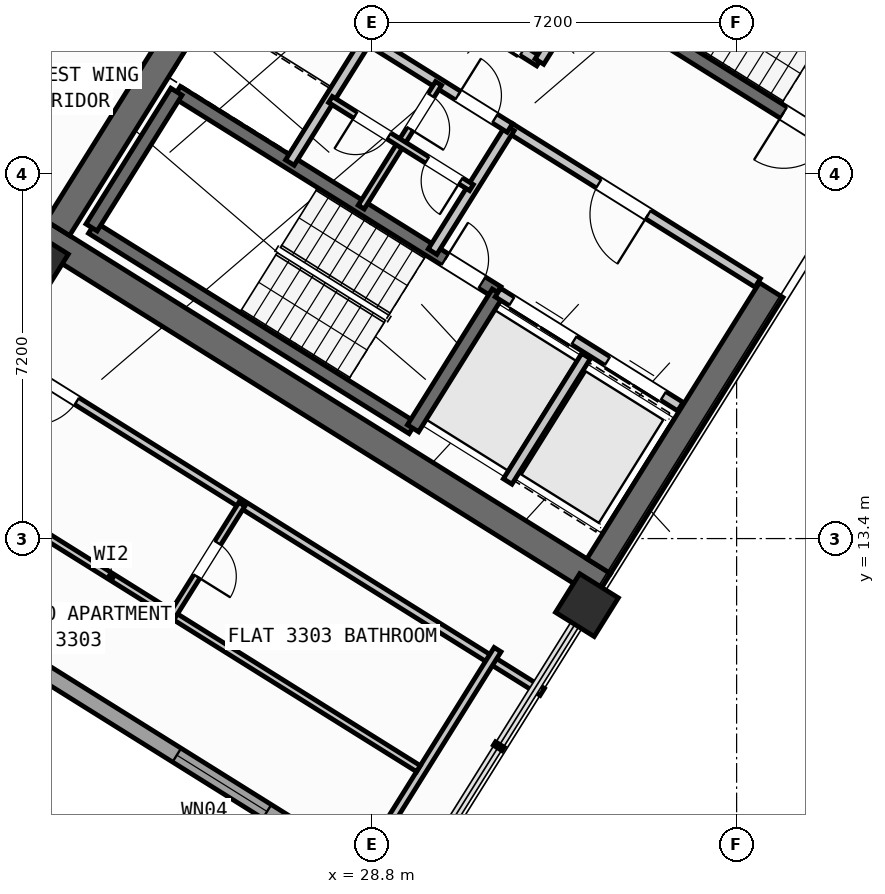
"""IFC4 building model, lengths in metres.
Left out: names, types, materials, properties, quantities, classifications, styles, units other than length and angle.
Written with IfcOpenShell. Run it as: python <this file> out.ifc"""

import sys

from ifc_helpers import new_model, si_unit, direction, frame, frame_2d, origin, origin_2d, place, context, subcontext, project, spatial, rectangle, hollow_rectangle, extrude, source, transform, mapped, element, fill, save


model = new_model("IFC4")
c1 = context("Model", 3, precision=1e-05, world=origin(), true_north=direction((0.0, 1.0)))
c2 = subcontext(c1, "Body", "Model", "MODEL_VIEW")
j1 = project(units=[si_unit("LENGTHUNIT", "METRE"), si_unit("PLANEANGLEUNIT", "RADIAN")], contexts=[c1])
p1 = place(None, origin())
s1 = spatial("IfcSite", under=j1, at=p1, CompositionType="ELEMENT")
p2 = place(p1, origin())
s2 = spatial("IfcBuilding", under=s1, at=p2, CompositionType="ELEMENT")
p3 = place(p2, frame((0.0, 0.0, 132.6)))
s3 = spatial("IfcBuildingStorey", under=s2, at=p3, CompositionType="ELEMENT", Elevation=132.6)
p4 = place(p3, frame((33.366, 12.477, 0.0), z_axis=(0.0, 0.0, 1.0), x_axis=(-0.848047359947, 0.529920442413, 0.0)))
e1 = element("IfcWall", 1, at=p4, inside=s3, PredefinedType="SHEAR", context=c2, shape_type="SweptSolid", body=[
    extrude(rectangle(XDim=13.14, YDim=0.55, at=frame_2d((6.57, 0.0))), origin(), (0.0, 0.0, 1.0), 3.32),
])
p5 = place(p3, frame((36.683, 18.304, 0.0), z_axis=(0.0, 0.0, 1.0), x_axis=(-0.529896466841, -0.848062341122, 0.0)))
e2 = element("IfcWall", 2, at=p5, inside=s3, PredefinedType="SHEAR", context=c2, shape_type="SweptSolid", body=[
    extrude(rectangle(XDim=6.425, YDim=0.55, at=frame_2d((3.212, 0.0))), origin(), (0.0, 0.0, 1.0), 3.32),
])
p6 = place(p3, frame((26.007, 24.976, 0.0), z_axis=(0.0, 0.0, 1.0), x_axis=(-0.529923795287, -0.848045264823, 0.0)))
e3 = element("IfcWall", 3, at=p6, inside=s3, PredefinedType="SHEAR", context=c2, shape_type="SweptSolid", body=[
    extrude(rectangle(XDim=6.425, YDim=0.55, at=frame_2d((3.212, 0.0))), origin(), (0.0, 0.0, 1.0), 3.32),
])
m1 = source(origin(), c2, "Body", "SweptSolid", [
    extrude(hollow_rectangle(XDim=0.9, YDim=0.9, WallThickness=0.036, at=origin_2d()), origin(), (0.0, 0.0, 1.0), 3.6),
])
for number, where, z_axis, x_axis in (
    (4, (33.046, 12.087, 0.0), (0.0, 0.0, 1.0), (-0.848, 0.53, 0.0)),
    (5, (22.191, 18.87, 0.0), (0.0, 0.0, 1.0), (-0.848, 0.53, 0.0)),
):
    element("IfcColumn", number, at=place(p3, frame(where, z_axis=z_axis, x_axis=x_axis)), inside=s3, PredefinedType="COLUMN", context=c2, shape_type="MappedRepresentation", body=[
        mapped(m1, transform((0.0, 0.0, 0.0), scale=1.0)),
    ])
p7 = place(p3, frame((29.268, 6.429, 0.0), z_axis=(0.0, 0.0, 1.0), x_axis=(-0.848049971435, 0.529916263149, 0.0)))
e6 = element("IfcWall", 6, at=p7, inside=s3, PredefinedType="STANDARD", context=c2, shape_type="SweptSolid", body=[
    extrude(rectangle(XDim=31.588, YDim=0.32, at=frame_2d((15.794, 0.0))), origin(), (0.0, 0.0, 1.0), 3.32),
])
p8 = place(p7, frame((16.362, 0.0, 0.0)))
e7 = element("IfcOpeningElement", 7, at=p8, cuts=e6, PredefinedType="OPENING", context=c2, shape_type="SweptSolid", body=[
    extrude(rectangle(XDim=1.2, YDim=2.15, at=frame_2d((0.6, 1.075))), frame((0.0, 0.17, 0.0), z_axis=(0.0, -1.0, 0.0), x_axis=(1.0, 0.0, 0.0)), (0.0, 0.0, 1.0), 0.34),
])
p9 = place(p7, frame((2.989, 0.0, 0.8)))
e8 = element("IfcOpeningElement", 8, at=p9, cuts=e6, PredefinedType="OPENING", context=c2, shape_type="SweptSolid", body=[
    extrude(rectangle(XDim=2.1, YDim=1.55, at=frame_2d((1.05, 0.775))), frame((0.0, 0.17, 0.0), z_axis=(0.0, -1.0, 0.0), x_axis=(1.0, 0.0, 0.0)), (0.0, 0.0, 1.0), 0.34),
])
p10 = place(p7, frame((8.359, 0.0, 0.8)))
e9 = element("IfcOpeningElement", 9, at=p10, cuts=e6, PredefinedType="OPENING", context=c2, shape_type="SweptSolid", body=[
    extrude(rectangle(XDim=2.1, YDim=1.55, at=frame_2d((1.05, 0.775))), frame((0.0, 0.17, 0.0), z_axis=(0.0, -1.0, 0.0), x_axis=(1.0, 0.0, 0.0)), (0.0, 0.0, 1.0), 0.34),
])
p11 = place(p7, frame((13.284, 0.0, 0.95)))
e10 = element("IfcOpeningElement", 10, at=p11, cuts=e6, PredefinedType="OPENING", context=c2, shape_type="SweptSolid", body=[
    extrude(rectangle(XDim=1.2, YDim=1.4, at=frame_2d((0.6, 0.7))), frame((0.0, 0.17, 0.0), z_axis=(0.0, -1.0, 0.0), x_axis=(1.0, 0.0, 0.0)), (0.0, 0.0, 1.0), 0.34),
])
p12 = place(p7, frame((20.39, 0.0, 0.95)))
e11 = element("IfcOpeningElement", 11, at=p12, cuts=e6, PredefinedType="OPENING", context=c2, shape_type="SweptSolid", body=[
    extrude(rectangle(XDim=1.2, YDim=1.4, at=frame_2d((0.6, 0.7))), frame((0.0, 0.17, 0.0), z_axis=(0.0, -1.0, 0.0), x_axis=(1.0, 0.0, 0.0)), (0.0, 0.0, 1.0), 0.34),
])
p13 = place(p7, frame((23.715, 0.0, 1.0)))
e12 = element("IfcOpeningElement", 12, at=p13, cuts=e6, PredefinedType="OPENING", context=c2, shape_type="SweptSolid", body=[
    extrude(rectangle(XDim=0.9, YDim=1.25, at=frame_2d((0.45, 0.625))), frame((0.0, 0.17, 0.0), z_axis=(0.0, -1.0, 0.0), x_axis=(1.0, 0.0, 0.0)), (0.0, 0.0, 1.0), 0.34),
])
p14 = place(p7, frame((27.481, 0.0, 0.8)))
e13 = element("IfcOpeningElement", 13, at=p14, cuts=e6, PredefinedType="OPENING", context=c2, shape_type="SweptSolid", body=[
    extrude(rectangle(XDim=2.1, YDim=1.55, at=frame_2d((1.05, 0.775))), frame((0.0, 0.17, 0.0), z_axis=(0.0, -1.0, 0.0), x_axis=(1.0, 0.0, 0.0)), (0.0, 0.0, 1.0), 0.34),
])
p15 = place(p3, frame((29.605, 15.581, 0.0), z_axis=(0.0, 0.0, 1.0), x_axis=(-0.848036911448, 0.529937163087, 0.0)))
e14 = element("IfcWall", 14, at=p15, inside=s3, PredefinedType="SHEAR", context=c2, shape_type="SweptSolid", body=[
    extrude(rectangle(XDim=7.46, YDim=0.26, at=frame_2d((3.73, 0.0))), origin(), (0.0, 0.0, 1.0), 3.32),
])
p16 = place(p3, frame((31.28, 18.261, 0.0), z_axis=(0.0, 0.0, 1.0), x_axis=(-0.848051618787, 0.529913626805, 0.0)))
e15 = element("IfcWall", 15, at=p16, inside=s3, PredefinedType="SHEAR", context=c2, shape_type="SweptSolid", body=[
    extrude(rectangle(XDim=7.46, YDim=0.26, at=frame_2d((3.73, 0.0))), origin(), (0.0, 0.0, 1.0), 3.32),
])
p17 = place(p16, frame((0.36, 0.0, 0.0)))
e16 = element("IfcOpeningElement", 16, at=p17, cuts=e15, PredefinedType="OPENING", context=c2, shape_type="SweptSolid", body=[
    extrude(rectangle(XDim=0.86, YDim=2.05, at=frame_2d((0.43, 1.025))), frame((0.0, 0.14, 0.0), z_axis=(0.0, -1.0, 0.0), x_axis=(1.0, 0.0, 0.0)), (0.0, 0.0, 1.0), 0.28),
])
p18 = place(p3, frame((31.288, 18.256, 0.0), z_axis=(0.0, 0.0, 1.0), x_axis=(-0.529943379326, -0.848033026897, 0.0)))
e17 = element("IfcWall", 17, at=p18, inside=s3, PredefinedType="SHEAR", context=c2, shape_type="SweptSolid", body=[
    extrude(rectangle(XDim=3.16, YDim=0.26, at=frame_2d((1.58, 0.0))), origin(), (0.0, 0.0, 1.0), 3.32),
])
p19 = place(p3, frame((24.945, 22.22, 0.0), z_axis=(0.0, 0.0, 1.0), x_axis=(-0.529908658664, -0.84805472316, 0.0)))
e18 = element("IfcWall", 18, at=p19, inside=s3, PredefinedType="SHEAR", context=c2, shape_type="SweptSolid", body=[
    extrude(rectangle(XDim=3.16, YDim=0.26, at=frame_2d((1.58, 0.0))), origin(), (0.0, 0.0, 1.0), 3.32),
])
p20 = place(p3, frame((38.046, 21.108, 0.0), z_axis=(0.0, 0.0, 1.0), x_axis=(-0.848054434086, 0.529909121291, 0.0)))
e19 = element("IfcWall", 19, at=p20, inside=s3, PredefinedType="SHEAR", context=c2, shape_type="SweptSolid", body=[
    extrude(rectangle(XDim=7.33, YDim=0.26, at=frame_2d((3.665, 0.0))), origin(), (0.0, 0.0, 1.0), 3.32),
])
p21 = place(p20, frame((0.22, 0.0, 0.0)))
e20 = element("IfcOpeningElement", 20, at=p21, cuts=e19, PredefinedType="OPENING", context=c2, shape_type="SweptSolid", body=[
    extrude(rectangle(XDim=1.1, YDim=2.1, at=frame_2d((0.55, 1.05))), frame((0.0, 0.14, 0.0), z_axis=(0.0, -1.0, 0.0), x_axis=(1.0, 0.0, 0.0)), (0.0, 0.0, 1.0), 0.28),
])
p22 = place(p3, frame((34.891, 16.005, 0.0), z_axis=(0.0, 0.0, 1.0), x_axis=(-0.848062873452, 0.529895614884, 0.0)))
e21 = element("IfcWall", 21, at=p22, inside=s3, PredefinedType="STANDARD", context=c2, shape_type="SweptSolid", body=[
    extrude(rectangle(XDim=4.248, YDim=0.2, at=frame_2d((2.124, 0.0))), origin(), (0.0, 0.0, 1.0), 3.31),
])
p23 = place(p22, frame((0.398, 0.0, 0.0)))
e22 = element("IfcOpeningElement", 22, at=p23, cuts=e21, PredefinedType="OPENING", context=c2, shape_type="SweptSolid", body=[
    extrude(rectangle(XDim=1.3, YDim=2.2, at=frame_2d((0.65, 1.1))), frame((0.0, 0.11, 0.0), z_axis=(0.0, -1.0, 0.0), x_axis=(1.0, 0.0, 0.0)), (0.0, 0.0, 1.0), 0.22),
])
p24 = place(p22, frame((2.473, 0.0, 0.0)))
e23 = element("IfcOpeningElement", 23, at=p24, cuts=e21, PredefinedType="OPENING", context=c2, shape_type="SweptSolid", body=[
    extrude(rectangle(XDim=1.45, YDim=2.25, at=frame_2d((0.725, 1.125))), frame((0.0, 0.11, 0.0), z_axis=(0.0, -1.0, 0.0), x_axis=(1.0, 0.0, 0.0)), (0.0, 0.0, 1.0), 0.22),
])
p25 = place(p3, frame((36.417, 18.447, 0.0), z_axis=(0.0, 0.0, 1.0), x_axis=(-0.848064879198, 0.529892404805, 0.0)))
e24 = element("IfcWall", 24, at=p25, inside=s3, PredefinedType="STANDARD", context=c2, shape_type="SweptSolid", body=[
    extrude(rectangle(XDim=5.768, YDim=0.2, at=frame_2d((2.884, 0.0))), origin(), (0.0, 0.0, 1.0), 3.31),
])
p26 = place(p25, frame((2.548, 0.0, 0.0)))
e25 = element("IfcOpeningElement", 25, at=p26, cuts=e24, PredefinedType="OPENING", context=c2, shape_type="SweptSolid", body=[
    extrude(rectangle(XDim=1.15, YDim=2.1, at=frame_2d((0.575, 1.05))), frame((0.0, 0.11, 0.0), z_axis=(0.0, -1.0, 0.0), x_axis=(1.0, 0.0, 0.0)), (0.0, 0.0, 1.0), 0.22),
])
p27 = place(p3, frame((32.108, 22.814, 0.0), z_axis=(0.0, 0.0, 1.0), x_axis=(-0.848042229521, 0.529928652696, 0.0)))
e26 = element("IfcWall", 26, at=p27, inside=s3, PredefinedType="STANDARD", context=c2, shape_type="SweptSolid", body=[
    extrude(rectangle(XDim=5.62, YDim=0.2, at=frame_2d((2.81, 0.0))), origin(), (0.0, 0.0, 1.0), 3.31),
])
p28 = place(p27, frame((0.39, 0.0, 0.0)))
e27 = element("IfcOpeningElement", 27, at=p28, cuts=e26, PredefinedType="OPENING", context=c2, shape_type="SweptSolid", body=[
    extrude(rectangle(XDim=1.1, YDim=2.15, at=frame_2d((0.55, 1.075))), frame((0.0, 0.11, 0.0), z_axis=(0.0, -1.0, 0.0), x_axis=(1.0, 0.0, 0.0)), (0.0, 0.0, 1.0), 0.22),
])
p29 = place(p27, frame((2.25, 0.0, 0.0)))
e28 = element("IfcOpeningElement", 28, at=p29, cuts=e26, PredefinedType="OPENING", context=c2, shape_type="SweptSolid", body=[
    extrude(rectangle(XDim=1.1, YDim=2.15, at=frame_2d((0.55, 1.075))), frame((0.0, 0.11, 0.0), z_axis=(0.0, -1.0, 0.0), x_axis=(1.0, 0.0, 0.0)), (0.0, 0.0, 1.0), 0.22),
])
p30 = place(p27, frame((4.11, 0.0, 0.0)))
e29 = element("IfcOpeningElement", 29, at=p30, cuts=e26, PredefinedType="OPENING", context=c2, shape_type="SweptSolid", body=[
    extrude(rectangle(XDim=1.1, YDim=2.15, at=frame_2d((0.55, 1.075))), frame((0.0, 0.11, 0.0), z_axis=(0.0, -1.0, 0.0), x_axis=(1.0, 0.0, 0.0)), (0.0, 0.0, 1.0), 0.22),
])
p31 = place(p3, frame((32.982, 24.213, 0.0), z_axis=(0.0, 0.0, 1.0), x_axis=(-0.529839334948, -0.84809803628, 0.0)))
e30 = element("IfcWall", 30, at=p31, inside=s3, PredefinedType="STANDARD", context=c2, shape_type="SweptSolid", body=[
    extrude(rectangle(XDim=1.65, YDim=0.2, at=frame_2d((0.825, 0.0))), origin(), (0.0, 0.0, 1.0), 3.31),
])
p32 = place(p3, frame((33.029, 17.003, 0.0), z_axis=(0.0, 0.0, 1.0), x_axis=(-0.529916267533, -0.848049968695, 0.0)))
e31 = element("IfcWall", 31, at=p32, inside=s3, PredefinedType="STANDARD", context=c2, shape_type="SweptSolid", body=[
    extrude(rectangle(XDim=2.92, YDim=0.2, at=frame_2d((1.46, 0.0))), origin(), (0.0, 0.0, 1.0), 3.31),
])
for number, where, z_axis, x_axis in (
    (32, (31.525, 21.504, 0.0), (0.0, 0.0, 1.0), (-0.53, -0.848, 0.0)),
    (33, (28.71, 23.263, 0.0), (0.0, 0.0, 1.0), (-0.53, -0.848, 0.0)),
):
    element("IfcWall", number, at=place(p3, frame(where, z_axis=z_axis, x_axis=x_axis)), inside=s3, PredefinedType="STANDARD", context=c2, shape_type="SweptSolid", body=[
        extrude(rectangle(XDim=2.88, YDim=0.2, at=frame_2d((1.44, 0.0))), origin(), (0.0, 0.0, 1.0), 3.31),
    ])
p33 = place(p3, frame((31.525, 21.504, 0.0), z_axis=(0.0, 0.0, 1.0), x_axis=(-0.848040211232, 0.529931882541, 0.0)))
e34 = element("IfcWall", 34, at=p33, inside=s3, PredefinedType="STANDARD", context=c2, shape_type="SweptSolid", body=[
    extrude(rectangle(XDim=6.218, YDim=0.2, at=frame_2d((3.109, 0.0))), origin(), (0.0, 0.0, 1.0), 3.31),
])
p34 = place(p33, frame((4.4, 0.0, 0.0)))
e35 = element("IfcOpeningElement", 35, at=p34, cuts=e34, PredefinedType="OPENING", context=c2, shape_type="SweptSolid", body=[
    extrude(rectangle(XDim=0.86, YDim=2.05, at=frame_2d((0.43, 1.025))), frame((0.0, 0.11, 0.0), z_axis=(0.0, -1.0, 0.0), x_axis=(1.0, 0.0, 0.0)), (0.0, 0.0, 1.0), 0.22),
])
p35 = place(p33, frame((0.35, 0.0, 0.0)))
e36 = element("IfcOpeningElement", 36, at=p35, cuts=e34, PredefinedType="OPENING", context=c2, shape_type="SweptSolid", body=[
    extrude(rectangle(XDim=0.86, YDim=2.05, at=frame_2d((0.43, 1.025))), frame((0.0, 0.11, 0.0), z_axis=(0.0, -1.0, 0.0), x_axis=(1.0, 0.0, 0.0)), (0.0, 0.0, 1.0), 0.22),
])
p36 = place(p3, frame((30.117, 22.384, 0.0), z_axis=(0.0, 0.0, 1.0), x_axis=(-0.529951914384, -0.848027693204, 0.0)))
e37 = element("IfcWall", 37, at=p36, inside=s3, PredefinedType="PLUMBINGWALL", context=c2, shape_type="SweptSolid", body=[
    extrude(rectangle(XDim=1.4, YDim=0.14, at=frame_2d((0.7, 0.0))), origin(), (0.0, 0.0, 1.0), 3.31),
])
p37 = place(p36, frame((0.28, 0.0, 0.0)))
e38 = element("IfcOpeningElement", 38, at=p37, cuts=e37, PredefinedType="OPENING", context=c2, shape_type="SweptSolid", body=[
    extrude(rectangle(XDim=0.78, YDim=2.05, at=frame_2d((0.39, 1.025))), frame((0.0, 0.08, 0.0), z_axis=(0.0, -1.0, 0.0), x_axis=(1.0, 0.0, 0.0)), (0.0, 0.0, 1.0), 0.16),
])
p38 = place(p3, frame((29.375, 21.196, 0.0), z_axis=(0.0, 0.0, 1.0), x_axis=(-0.529865479138, -0.848081702443, 0.0)))
e39 = element("IfcWall", 39, at=p38, inside=s3, PredefinedType="PLUMBINGWALL", context=c2, shape_type="SweptSolid", body=[
    extrude(rectangle(XDim=1.48, YDim=0.14, at=frame_2d((0.74, 0.0))), origin(), (0.0, 0.0, 1.0), 3.31),
])
p39 = place(p3, frame((30.766, 20.327, 0.0), z_axis=(0.0, 0.0, 1.0), x_axis=(-0.848052663127, 0.529911955482, 0.0)))
e40 = element("IfcWall", 40, at=p39, inside=s3, PredefinedType="PLUMBINGWALL", context=c2, shape_type="SweptSolid", body=[
    extrude(rectangle(XDim=3.28, YDim=0.14, at=frame_2d((1.64, 0.0))), origin(), (0.0, 0.0, 1.0), 3.31),
])
p40 = place(p39, frame((0.25, 0.0, 0.0)))
e41 = element("IfcOpeningElement", 41, at=p40, cuts=e40, PredefinedType="OPENING", context=c2, shape_type="SweptSolid", body=[
    extrude(rectangle(XDim=0.78, YDim=2.05, at=frame_2d((0.39, 1.025))), frame((0.0, 0.08, 0.0), z_axis=(0.0, -1.0, 0.0), x_axis=(1.0, 0.0, 0.0)), (0.0, 0.0, 1.0), 0.16),
])
p41 = place(p39, frame((1.92, 0.0, 0.0)))
e42 = element("IfcOpeningElement", 42, at=p41, cuts=e40, PredefinedType="OPENING", context=c2, shape_type="SweptSolid", body=[
    extrude(rectangle(XDim=0.78, YDim=2.05, at=frame_2d((0.39, 1.025))), frame((0.0, 0.08, 0.0), z_axis=(0.0, -1.0, 0.0), x_axis=(1.0, 0.0, 0.0)), (0.0, 0.0, 1.0), 0.16),
])
p42 = place(p3, frame((24.588, 27.631, 0.0), z_axis=(0.0, 0.0, 1.0), x_axis=(-0.529914586043, -0.848051019396, 0.0)))
e43 = element("IfcWall", 43, at=p42, inside=s3, PredefinedType="PARTITIONING", context=c2, shape_type="SweptSolid", body=[
    extrude(rectangle(XDim=15.35, YDim=0.16, at=frame_2d((7.675, 0.0))), origin(), (0.0, 0.0, 1.0), 3.31),
])
p43 = place(p3, frame((32.164, 10.374, 0.0), z_axis=(0.0, 0.0, 1.0), x_axis=(-0.848044107957, 0.529925646633, 0.0)))
e44 = element("IfcWall", 44, at=p43, inside=s3, PredefinedType="PARTITIONING", context=c2, shape_type="SweptSolid", body=[
    extrude(rectangle(XDim=15.57, YDim=0.16, at=frame_2d((7.785, 0.0))), origin(), (0.0, 0.0, 1.0), 3.31),
])
p44 = place(p43, frame((10.83, 0.0, 0.0)))
e45 = element("IfcOpeningElement", 45, at=p44, cuts=e44, PredefinedType="OPENING", context=c2, shape_type="SweptSolid", body=[
    extrude(rectangle(XDim=1.0, YDim=2.1, at=frame_2d((0.5, 1.05))), frame((0.0, 0.09, 0.0), z_axis=(0.0, -1.0, 0.0), x_axis=(1.0, 0.0, 0.0)), (0.0, 0.0, 1.0), 0.18),
])
p45 = place(p3, frame((31.282, 11.208, 0.0), z_axis=(0.0, 0.0, 1.0), x_axis=(-0.529938869374, -0.84803584519, 0.0)))
e46 = element("IfcWall", 46, at=p45, inside=s3, PredefinedType="PARTITIONING", context=c2, shape_type="SweptSolid", body=[
    extrude(rectangle(XDim=5.48, YDim=0.16, at=frame_2d((2.74, 0.0))), origin(), (0.0, 0.0, 1.0), 3.31),
])
p46 = place(p3, frame((29.72, 8.859, 0.0), z_axis=(0.0, 0.0, 1.0), x_axis=(-0.848049134363, 0.529917602752, 0.0)))
e47 = element("IfcWall", 47, at=p46, inside=s3, PredefinedType="PLUMBINGWALL", context=c2, shape_type="SweptSolid", body=[
    extrude(rectangle(XDim=14.3, YDim=0.14, at=frame_2d((7.15, 0.0))), origin(), (0.0, 0.0, 1.0), 3.31),
])
p47 = place(p46, frame((9.57, 0.0, 0.0)))
e48 = element("IfcOpeningElement", 48, at=p47, cuts=e47, PredefinedType="OPENING", context=c2, shape_type="SweptSolid", body=[
    extrude(rectangle(XDim=0.92, YDim=2.08, at=frame_2d((0.46, 1.04))), frame((0.0, 0.08, 0.0), z_axis=(0.0, -1.0, 0.0), x_axis=(1.0, 0.0, 0.0)), (0.0, 0.0, 1.0), 0.16),
])
p48 = place(p3, frame((26.237, 14.078, 0.0), z_axis=(0.0, 0.0, 1.0), x_axis=(-0.52995640672, -0.848024885824, 0.0)))
e49 = element("IfcWall", 49, at=p48, inside=s3, PredefinedType="PLUMBINGWALL", context=c2, shape_type="SweptSolid", body=[
    extrude(rectangle(XDim=2.58, YDim=0.14, at=frame_2d((1.29, 0.0))), origin(), (0.0, 0.0, 1.0), 3.31),
])
p49 = place(p48, frame((0.9, 0.0, 0.0)))
e50 = element("IfcOpeningElement", 50, at=p49, cuts=e49, PredefinedType="OPENING", context=c2, shape_type="SweptSolid", body=[
    extrude(rectangle(XDim=0.78, YDim=2.05, at=frame_2d((0.39, 1.025))), frame((0.0, 0.08, 0.0), z_axis=(0.0, -1.0, 0.0), x_axis=(1.0, 0.0, 0.0)), (0.0, 0.0, 1.0), 0.16),
])
m2 = source(origin(), c2, "Body", "SweptSolid", [
    extrude(rectangle(XDim=2.1, YDim=1.55, at=frame_2d((1.05, 0.775))), frame((0.0, 0.03, 0.0), z_axis=(0.0, -1.0, 0.0), x_axis=(1.0, 0.0, 0.0)), (0.0, 0.0, 1.0), 0.06),
])
p50 = place(p9, origin())
e51 = element("IfcWindow", 51, at=p50, inside=s3, PartitioningType="SINGLE_PANEL", PredefinedType="WINDOW", context=c2, shape_type="MappedRepresentation", body=[
    mapped(m2, transform((0.0, 0.0, 0.0), scale=1.0)),
])
fill(e8, e51)
m3 = source(origin(), c2, "Body", "SweptSolid", [
    extrude(rectangle(XDim=0.86, YDim=2.05, at=frame_2d((0.43, 1.025))), frame((0.0, 0.025, 0.0), z_axis=(0.0, -1.0, 0.0), x_axis=(1.0, 0.0, 0.0)), (0.0, 0.0, 1.0), 0.05),
])
p51 = place(p17, frame((0.86, 0.0, 0.0), z_axis=(0.0, 0.0, 1.0), x_axis=(-1.0, 0.0, 0.0)))
e52 = element("IfcDoor", 52, at=p51, inside=s3, OperationType="SINGLE_SWING_LEFT", PredefinedType="DOOR", context=c2, shape_type="MappedRepresentation", body=[
    mapped(m3, transform((0.0, 0.0, 0.0), scale=1.0)),
])
fill(e16, e52)
m4 = source(origin(), c2, "Body", "SweptSolid", [
    extrude(rectangle(XDim=1.1, YDim=2.1, at=frame_2d((0.55, 1.05))), frame((0.0, 0.025, 0.0), z_axis=(0.0, -1.0, 0.0), x_axis=(1.0, 0.0, 0.0)), (0.0, 0.0, 1.0), 0.05),
])
p52 = place(p21, origin())
e53 = element("IfcDoor", 53, at=p52, inside=s3, OperationType="SINGLE_SWING_RIGHT", PredefinedType="DOOR", context=c2, shape_type="MappedRepresentation", body=[
    mapped(m4, transform((0.0, 0.0, 0.0), scale=1.0)),
])
fill(e20, e53)
m5 = source(origin(), c2, "Body", "SweptSolid", [
    extrude(rectangle(XDim=1.15, YDim=2.1, at=frame_2d((0.575, 1.05))), frame((0.0, 0.025, 0.0), z_axis=(0.0, -1.0, 0.0), x_axis=(1.0, 0.0, 0.0)), (0.0, 0.0, 1.0), 0.05),
])
p53 = place(p26, origin())
e54 = element("IfcDoor", 54, at=p53, inside=s3, OperationType="SINGLE_SWING_LEFT", PredefinedType="DOOR", context=c2, shape_type="MappedRepresentation", body=[
    mapped(m5, transform((0.0, 0.0, 0.0), scale=1.0)),
])
fill(e25, e54)
m6 = source(origin(), c2, "Body", "SweptSolid", [
    extrude(rectangle(XDim=1.3, YDim=2.2, at=frame_2d((0.65, 1.1))), frame((0.0, 0.025, 0.0), z_axis=(0.0, -1.0, 0.0), x_axis=(1.0, 0.0, 0.0)), (0.0, 0.0, 1.0), 0.05),
])
p54 = place(p23, origin())
e55 = element("IfcDoor", 55, at=p54, inside=s3, OperationType="DOUBLE_DOOR_SLIDING", PredefinedType="DOOR", context=c2, shape_type="MappedRepresentation", body=[
    mapped(m6, transform((0.0, 0.0, 0.0), scale=1.0)),
])
fill(e22, e55)
m7 = source(origin(), c2, "Body", "SweptSolid", [
    extrude(rectangle(XDim=1.45, YDim=2.25, at=frame_2d((0.725, 1.125))), frame((0.0, 0.025, 0.0), z_axis=(0.0, -1.0, 0.0), x_axis=(1.0, 0.0, 0.0)), (0.0, 0.0, 1.0), 0.05),
])
p55 = place(p24, origin())
e56 = element("IfcDoor", 56, at=p55, inside=s3, OperationType="DOUBLE_DOOR_SLIDING", PredefinedType="DOOR", context=c2, shape_type="MappedRepresentation", body=[
    mapped(m7, transform((0.0, 0.0, 0.0), scale=1.0)),
])
fill(e23, e56)
p56 = place(p35, frame((0.86, 0.0, 0.0), z_axis=(0.0, 0.0, 1.0), x_axis=(-1.0, 0.0, 0.0)))
e57 = element("IfcDoor", 57, at=p56, inside=s3, OperationType="SINGLE_SWING_LEFT", PredefinedType="DOOR", context=c2, shape_type="MappedRepresentation", body=[
    mapped(m3, transform((0.0, 0.0, 0.0), scale=1.0)),
])
fill(e36, e57)
m8 = source(origin(), c2, "Body", "SweptSolid", [
    extrude(rectangle(XDim=0.78, YDim=2.05, at=frame_2d((0.39, 1.025))), frame((0.0, 0.025, 0.0), z_axis=(0.0, -1.0, 0.0), x_axis=(1.0, 0.0, 0.0)), (0.0, 0.0, 1.0), 0.05),
])
p57 = place(p37, origin())
e58 = element("IfcDoor", 58, at=p57, inside=s3, OperationType="SINGLE_SWING_RIGHT", PredefinedType="DOOR", context=c2, shape_type="MappedRepresentation", body=[
    mapped(m8, transform((0.0, 0.0, 0.0), scale=1.0)),
])
fill(e38, e58)
p58 = place(p40, origin())
e59 = element("IfcDoor", 59, at=p58, inside=s3, OperationType="SINGLE_SWING_LEFT", PredefinedType="DOOR", context=c2, shape_type="MappedRepresentation", body=[
    mapped(m8, transform((0.0, 0.0, 0.0), scale=1.0)),
])
fill(e41, e59)
p59 = place(p41, origin())
e60 = element("IfcDoor", 60, at=p59, inside=s3, OperationType="SINGLE_SWING_RIGHT", PredefinedType="DOOR", context=c2, shape_type="MappedRepresentation", body=[
    mapped(m8, transform((0.0, 0.0, 0.0), scale=1.0)),
])
fill(e42, e60)
m9 = source(origin(), c2, "Body", "SweptSolid", [
    extrude(rectangle(XDim=1.0, YDim=2.1, at=frame_2d((0.5, 1.05))), frame((0.0, 0.025, 0.0), z_axis=(0.0, -1.0, 0.0), x_axis=(1.0, 0.0, 0.0)), (0.0, 0.0, 1.0), 0.05),
])
p60 = place(p44, origin())
e61 = element("IfcDoor", 61, at=p60, inside=s3, OperationType="SINGLE_SWING_RIGHT", PredefinedType="DOOR", context=c2, shape_type="MappedRepresentation", body=[
    mapped(m9, transform((0.0, 0.0, 0.0), scale=1.0)),
])
fill(e45, e61)
p61 = place(p49, origin())
e62 = element("IfcDoor", 62, at=p61, inside=s3, OperationType="SINGLE_SWING_RIGHT", PredefinedType="DOOR", context=c2, shape_type="MappedRepresentation", body=[
    mapped(m8, transform((0.0, 0.0, 0.0), scale=1.0)),
])
fill(e50, e62)
save(model, sys.argv[1])
